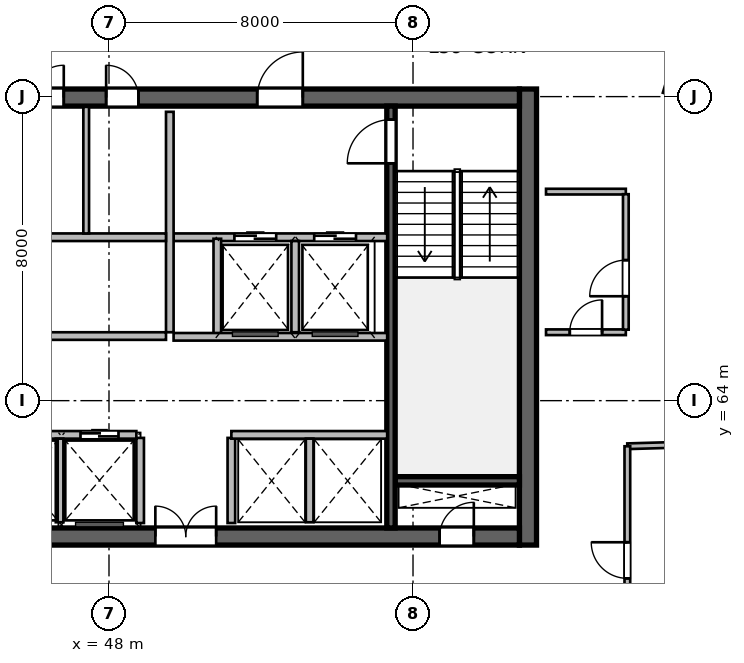
"""IFC4 building model, lengths in metres.
Left out: names, types, materials, properties, quantities, classifications, styles, units other than length and angle.
Written with IfcOpenShell. Run it as: python <this file> out.ifc"""

import sys

from ifc_helpers import new_model, si_unit, direction, frame, frame_2d, origin, place, context, subcontext, project, spatial, rectangle, extrude, source, transform, mapped, element, fill, save


model = new_model("IFC4")
c1 = context("Model", 3, precision=1e-05, world=origin(), true_north=direction((0.0, 1.0)))
c2 = subcontext(c1, "Body", "Model", "MODEL_VIEW")
j1 = project(units=[si_unit("LENGTHUNIT", "METRE"), si_unit("PLANEANGLEUNIT", "RADIAN")], contexts=[c1])
p1 = place(None, origin())
s1 = spatial("IfcSite", under=j1, at=p1, CompositionType="ELEMENT")
p2 = place(p1, origin())
s2 = spatial("IfcBuilding", under=s1, at=p2, CompositionType="ELEMENT")
p3 = place(p2, frame((0.0, 0.0, 243.0)))
s3 = spatial("IfcBuildingStorey", under=s2, at=p3, CompositionType="ELEMENT", Elevation=243.0)
m1 = source(origin(), c2, "Body", "SweptSolid", [
    extrude(rectangle(XDim=12.0, YDim=0.45, at=frame_2d((6.0, 0.0))), origin(), (0.0, 0.0, 1.0), 3.9),
])
p4 = place(p3, frame((59.025, 60.2, 0.0), z_axis=(0.0, 0.0, 1.0), x_axis=(0.0, 1.0, 0.0)))
e1 = element("IfcWall", 1, at=p4, inside=s3, PredefinedType="SHEAR", context=c2, shape_type="MappedRepresentation", body=[
    mapped(m1, transform((0.0, 0.0, 0.0), scale=1.0)),
])
m2 = source(origin(), c2, "Body", "SweptSolid", [
    extrude(rectangle(XDim=21.6, YDim=0.45, at=frame_2d((10.8, 0.0))), origin(), (0.0, 0.0, 1.0), 3.9),
])
p5 = place(p3, frame((37.2, 60.425, 0.0), z_axis=(0.0, 0.0, 1.0), x_axis=(1.0, 0.0, 0.0)))
e2 = element("IfcWall", 2, at=p5, inside=s3, PredefinedType="SHEAR", context=c2, shape_type="MappedRepresentation", body=[
    mapped(m2, transform((0.0, 0.0, 0.0), scale=1.0)),
])
p6 = place(p5, frame((1.1, 0.0, 0.0)))
e3 = element("IfcOpeningElement", 3, at=p6, cuts=e2, PredefinedType="OPENING", context=c2, shape_type="SweptSolid", body=[
    extrude(rectangle(XDim=1.15, YDim=2.15, at=frame_2d((0.575, 1.075))), frame((0.0, 0.235, 0.0), z_axis=(0.0, -1.0, 0.0), x_axis=(1.0, 0.0, 0.0)), (0.0, 0.0, 1.0), 0.47),
])
p7 = place(p5, frame((19.5, 0.0, 0.0)))
e4 = element("IfcOpeningElement", 4, at=p7, cuts=e2, PredefinedType="OPENING", context=c2, shape_type="SweptSolid", body=[
    extrude(rectangle(XDim=0.9, YDim=2.1, at=frame_2d((0.45, 1.05))), frame((0.0, 0.235, 0.0), z_axis=(0.0, -1.0, 0.0), x_axis=(1.0, 0.0, 0.0)), (0.0, 0.0, 1.0), 0.47),
])
p8 = place(p5, frame((12.02, 0.0, 0.0)))
e5 = element("IfcOpeningElement", 5, at=p8, cuts=e2, PredefinedType="OPENING", context=c2, shape_type="SweptSolid", body=[
    extrude(rectangle(XDim=1.6, YDim=2.15, at=frame_2d((0.8, 1.075))), frame((0.0, 0.235, 0.0), z_axis=(0.0, -1.0, 0.0), x_axis=(1.0, 0.0, 0.0)), (0.0, 0.0, 1.0), 0.47),
])
p9 = place(p3, frame((37.2, 71.975, 0.0), z_axis=(0.0, 0.0, 1.0), x_axis=(1.0, 0.0, 0.0)))
e6 = element("IfcWall", 6, at=p9, inside=s3, PredefinedType="SHEAR", context=c2, shape_type="MappedRepresentation", body=[
    mapped(m2, transform((0.0, 0.0, 0.0), scale=1.0)),
])
p10 = place(p9, frame((1.2, 0.0, 0.0)))
e7 = element("IfcOpeningElement", 7, at=p10, cuts=e6, PredefinedType="OPENING", context=c2, shape_type="SweptSolid", body=[
    extrude(rectangle(XDim=0.9, YDim=2.1, at=frame_2d((0.45, 1.05))), frame((0.0, 0.235, 0.0), z_axis=(0.0, -1.0, 0.0), x_axis=(1.0, 0.0, 0.0)), (0.0, 0.0, 1.0), 0.47),
])
p11 = place(p9, frame((14.7, 0.0, 0.0)))
e8 = element("IfcOpeningElement", 8, at=p11, cuts=e6, PredefinedType="OPENING", context=c2, shape_type="SweptSolid", body=[
    extrude(rectangle(XDim=1.2, YDim=2.15, at=frame_2d((0.6, 1.075))), frame((0.0, 0.235, 0.0), z_axis=(0.0, -1.0, 0.0), x_axis=(1.0, 0.0, 0.0)), (0.0, 0.0, 1.0), 0.47),
])
p12 = place(p9, frame((4.15, 0.0, 0.0)))
e9 = element("IfcOpeningElement", 9, at=p12, cuts=e6, PredefinedType="OPENING", context=c2, shape_type="SweptSolid", body=[
    extrude(rectangle(XDim=1.3, YDim=2.15, at=frame_2d((0.65, 1.075))), frame((0.0, 0.235, 0.0), z_axis=(0.0, -1.0, 0.0), x_axis=(1.0, 0.0, 0.0)), (0.0, 0.0, 1.0), 0.47),
])
p13 = place(p9, frame((6.76, 0.0, 0.0)))
e10 = element("IfcOpeningElement", 10, at=p13, cuts=e6, PredefinedType="OPENING", context=c2, shape_type="SweptSolid", body=[
    extrude(rectangle(XDim=0.85, YDim=2.1, at=frame_2d((0.425, 1.05))), frame((0.0, 0.235, 0.0), z_axis=(0.0, -1.0, 0.0), x_axis=(1.0, 0.0, 0.0)), (0.0, 0.0, 1.0), 0.47),
])
p14 = place(p9, frame((8.76, 0.0, 0.0)))
e11 = element("IfcOpeningElement", 11, at=p14, cuts=e6, PredefinedType="OPENING", context=c2, shape_type="SweptSolid", body=[
    extrude(rectangle(XDim=0.85, YDim=2.1, at=frame_2d((0.425, 1.05))), frame((0.0, 0.235, 0.0), z_axis=(0.0, -1.0, 0.0), x_axis=(1.0, 0.0, 0.0)), (0.0, 0.0, 1.0), 0.47),
])
p15 = place(p9, frame((10.725, 0.0, 0.0)))
e12 = element("IfcOpeningElement", 12, at=p15, cuts=e6, PredefinedType="OPENING", context=c2, shape_type="SweptSolid", body=[
    extrude(rectangle(XDim=0.85, YDim=2.1, at=frame_2d((0.425, 1.05))), frame((0.0, 0.235, 0.0), z_axis=(0.0, -1.0, 0.0), x_axis=(1.0, 0.0, 0.0)), (0.0, 0.0, 1.0), 0.47),
])
m3 = source(origin(), c2, "Body", "SweptSolid", [
    extrude(rectangle(XDim=3.27, YDim=0.22, at=frame_2d((1.635, 0.0))), origin(), (0.0, 0.0, 1.0), 3.9),
])
p16 = place(p3, frame((55.53, 61.89, 0.0), z_axis=(0.0, 0.0, 1.0), x_axis=(1.0, 0.0, 0.0)))
e13 = element("IfcWall", 13, at=p16, inside=s3, PredefinedType="SHEAR", context=c2, shape_type="MappedRepresentation", body=[
    mapped(m3, transform((0.0, 0.0, 0.0), scale=1.0)),
])
m4 = source(origin(), c2, "Body", "SweptSolid", [
    extrude(rectangle(XDim=11.1, YDim=0.22, at=frame_2d((5.55, 0.0))), origin(), (0.0, 0.0, 1.0), 3.9),
])
p17 = place(p3, frame((55.42, 60.65, 0.0), z_axis=(0.0, 0.0, 1.0), x_axis=(0.0, 1.0, 0.0)))
e14 = element("IfcWall", 14, at=p17, inside=s3, PredefinedType="SHEAR", context=c2, shape_type="MappedRepresentation", body=[
    mapped(m4, transform((0.0, 0.0, 0.0), scale=1.0)),
])
p18 = place(p17, frame((9.595, 0.0, 0.0)))
e15 = element("IfcOpeningElement", 15, at=p18, cuts=e14, PredefinedType="OPENING", context=c2, shape_type="SweptSolid", body=[
    extrude(rectangle(XDim=1.15, YDim=2.15, at=frame_2d((0.575, 1.075))), frame((0.0, 0.12, 0.0), z_axis=(0.0, -1.0, 0.0), x_axis=(1.0, 0.0, 0.0)), (0.0, 0.0, 1.0), 0.24),
])
m5 = source(origin(), c2, "Body", "SweptSolid", [
    extrude(rectangle(XDim=2.24, YDim=0.2, at=frame_2d((1.12, 0.0))), origin(), (0.0, 0.0, 1.0), 3.65),
])
for number, where, z_axis, x_axis in (
    (16, (48.82, 60.78, 0.0), (0.0, 0.0, 1.0), (0.0, 1.0, 0.0)),
    (17, (51.22, 60.78, 0.0), (0.0, 0.0, 1.0), (0.0, 1.0, 0.0)),
):
    element("IfcWall", number, at=place(p3, frame(where, z_axis=z_axis, x_axis=x_axis)), inside=s3, PredefinedType="SOLIDWALL", context=c2, shape_type="MappedRepresentation", body=[
        mapped(m5, transform((0.0, 0.0, 0.0), scale=1.0)),
    ])
m6 = source(origin(), c2, "Body", "SweptSolid", [
    extrude(rectangle(XDim=5.62, YDim=0.2, at=frame_2d((2.81, 0.0))), origin(), (0.0, 0.0, 1.0), 3.65),
])
p19 = place(p3, frame((49.7, 68.3, 0.0), z_axis=(0.0, 0.0, 1.0), x_axis=(1.0, 0.0, 0.0)))
e18 = element("IfcWall", 18, at=p19, inside=s3, PredefinedType="SOLIDWALL", context=c2, shape_type="MappedRepresentation", body=[
    mapped(m6, transform((0.0, 0.0, 0.0), scale=1.0)),
])
p20 = place(p19, frame((1.6, 0.0, 0.0)))
e19 = element("IfcOpeningElement", 19, at=p20, cuts=e18, PredefinedType="OPENING", context=c2, shape_type="SweptSolid", body=[
    extrude(rectangle(XDim=1.1, YDim=2.15, at=frame_2d((0.55, 1.075))), frame((0.0, 0.11, 0.0), z_axis=(0.0, -1.0, 0.0), x_axis=(1.0, 0.0, 0.0)), (0.0, 0.0, 1.0), 0.22),
])
p21 = place(p19, frame((3.7, 0.0, 0.0)))
e20 = element("IfcOpeningElement", 20, at=p21, cuts=e18, PredefinedType="OPENING", context=c2, shape_type="SweptSolid", body=[
    extrude(rectangle(XDim=1.1, YDim=2.15, at=frame_2d((0.55, 1.075))), frame((0.0, 0.11, 0.0), z_axis=(0.0, -1.0, 0.0), x_axis=(1.0, 0.0, 0.0)), (0.0, 0.0, 1.0), 0.22),
])
m7 = source(origin(), c2, "Body", "SweptSolid", [
    extrude(rectangle(XDim=5.8, YDim=0.2, at=frame_2d((2.9, 0.0))), origin(), (0.0, 0.0, 1.0), 3.65),
])
p22 = place(p3, frame((49.6, 65.8, 0.0), z_axis=(0.0, 0.0, 1.0), x_axis=(0.0, 1.0, 0.0)))
e21 = element("IfcWall", 21, at=p22, inside=s3, PredefinedType="SOLIDWALL", context=c2, shape_type="MappedRepresentation", body=[
    mapped(m7, transform((0.0, 0.0, 0.0), scale=1.0)),
])
m8 = source(origin(), c2, "Body", "SweptSolid", [
    extrude(rectangle(XDim=2.58, YDim=0.2, at=frame_2d((1.29, 0.0))), origin(), (0.0, 0.0, 1.0), 3.65),
])
p23 = place(p3, frame((50.85, 65.68, 0.0), z_axis=(0.0, 0.0, 1.0), x_axis=(0.0, 1.0, 0.0)))
e22 = element("IfcWall", 22, at=p23, inside=s3, PredefinedType="SOLIDWALL", context=c2, shape_type="MappedRepresentation", body=[
    mapped(m8, transform((0.0, 0.0, 0.0), scale=1.0)),
])
m9 = source(origin(), c2, "Body", "SweptSolid", [
    extrude(rectangle(XDim=2.4, YDim=0.2, at=frame_2d((1.2, 0.0))), origin(), (0.0, 0.0, 1.0), 3.65),
])
p24 = place(p3, frame((52.9, 65.8, 0.0), z_axis=(0.0, 0.0, 1.0), x_axis=(0.0, 1.0, 0.0)))
e23 = element("IfcWall", 23, at=p24, inside=s3, PredefinedType="SOLIDWALL", context=c2, shape_type="MappedRepresentation", body=[
    mapped(m9, transform((0.0, 0.0, 0.0), scale=1.0)),
])
p25 = place(p3, frame((49.7, 65.68, 0.0), z_axis=(0.0, 0.0, 1.0), x_axis=(1.0, 0.0, 0.0)))
e24 = element("IfcWall", 24, at=p25, inside=s3, PredefinedType="SOLIDWALL", context=c2, shape_type="MappedRepresentation", body=[
    mapped(m6, transform((0.0, 0.0, 0.0), scale=1.0)),
])
m10 = source(origin(), c2, "Body", "SweptSolid", [
    extrude(rectangle(XDim=8.8, YDim=0.2, at=frame_2d((4.4, 0.0))), origin(), (0.0, 0.0, 1.0), 3.65),
])
p26 = place(p3, frame((40.7, 68.3, 0.0), z_axis=(0.0, 0.0, 1.0), x_axis=(1.0, 0.0, 0.0)))
e25 = element("IfcWall", 25, at=p26, inside=s3, PredefinedType="SOLIDWALL", context=c2, shape_type="MappedRepresentation", body=[
    mapped(m10, transform((0.0, 0.0, 0.0), scale=1.0)),
])
m11 = source(origin(), c2, "Body", "SweptSolid", [
    extrude(rectangle(XDim=3.33, YDim=0.15, at=frame_2d((1.665, 0.0))), origin(), (0.0, 0.0, 1.0), 3.65),
])
p27 = place(p3, frame((47.4, 68.4, 0.0), z_axis=(0.0, 0.0, 1.0), x_axis=(0.0, 1.0, 0.0)))
e26 = element("IfcWall", 26, at=p27, inside=s3, PredefinedType="PARTITIONING", context=c2, shape_type="MappedRepresentation", body=[
    mapped(m11, transform((0.0, 0.0, 0.0), scale=1.0)),
])
m12 = source(origin(), c2, "Body", "SweptSolid", [
    extrude(rectangle(XDim=8.02, YDim=0.2, at=frame_2d((4.01, 0.0))), origin(), (0.0, 0.0, 1.0), 3.65),
])
p28 = place(p3, frame((40.7, 63.1, 0.0), z_axis=(0.0, 0.0, 1.0), x_axis=(1.0, 0.0, 0.0)))
e27 = element("IfcWall", 27, at=p28, inside=s3, PredefinedType="SOLIDWALL", context=c2, shape_type="MappedRepresentation", body=[
    mapped(m12, transform((0.0, 0.0, 0.0), scale=1.0)),
])
p29 = place(p28, frame((0.72, 0.0, 0.0)))
e28 = element("IfcOpeningElement", 28, at=p29, cuts=e27, PredefinedType="OPENING", context=c2, shape_type="SweptSolid", body=[
    extrude(rectangle(XDim=1.0, YDim=2.15, at=frame_2d((0.5, 1.075))), frame((0.0, 0.11, 0.0), z_axis=(0.0, -1.0, 0.0), x_axis=(1.0, 0.0, 0.0)), (0.0, 0.0, 1.0), 0.22),
])
p30 = place(p28, frame((2.62, 0.0, 0.0)))
e29 = element("IfcOpeningElement", 29, at=p30, cuts=e27, PredefinedType="OPENING", context=c2, shape_type="SweptSolid", body=[
    extrude(rectangle(XDim=1.0, YDim=2.15, at=frame_2d((0.5, 1.075))), frame((0.0, 0.11, 0.0), z_axis=(0.0, -1.0, 0.0), x_axis=(1.0, 0.0, 0.0)), (0.0, 0.0, 1.0), 0.22),
])
p31 = place(p28, frame((4.55, 0.0, 0.0)))
e30 = element("IfcOpeningElement", 30, at=p31, cuts=e27, PredefinedType="OPENING", context=c2, shape_type="SweptSolid", body=[
    extrude(rectangle(XDim=1.0, YDim=2.15, at=frame_2d((0.5, 1.075))), frame((0.0, 0.11, 0.0), z_axis=(0.0, -1.0, 0.0), x_axis=(1.0, 0.0, 0.0)), (0.0, 0.0, 1.0), 0.22),
])
p32 = place(p28, frame((6.55, 0.0, 0.0)))
e31 = element("IfcOpeningElement", 31, at=p32, cuts=e27, PredefinedType="OPENING", context=c2, shape_type="SweptSolid", body=[
    extrude(rectangle(XDim=1.0, YDim=2.15, at=frame_2d((0.5, 1.075))), frame((0.0, 0.11, 0.0), z_axis=(0.0, -1.0, 0.0), x_axis=(1.0, 0.0, 0.0)), (0.0, 0.0, 1.0), 0.22),
])
m13 = source(origin(), c2, "Body", "SweptSolid", [
    extrude(rectangle(XDim=4.1, YDim=0.2, at=frame_2d((2.05, 0.0))), origin(), (0.0, 0.0, 1.0), 3.65),
])
p33 = place(p3, frame((51.22, 63.1, 0.0), z_axis=(0.0, 0.0, 1.0), x_axis=(1.0, 0.0, 0.0)))
e32 = element("IfcWall", 32, at=p33, inside=s3, PredefinedType="SOLIDWALL", context=c2, shape_type="MappedRepresentation", body=[
    mapped(m13, transform((0.0, 0.0, 0.0), scale=1.0)),
])
m14 = source(origin(), c2, "Body", "SweptSolid", [
    extrude(rectangle(XDim=2.2, YDim=0.2, at=frame_2d((1.1, 0.0))), origin(), (0.0, 0.0, 1.0), 3.65),
])
for number, where, z_axis, x_axis in (
    (33, (46.7, 60.8, 0.0), (0.0, 0.0, 1.0), (0.0, 1.0, 0.0)),
    (34, (53.28, 60.8, 0.0), (0.0, 0.0, 1.0), (0.0, 1.0, 0.0)),
):
    element("IfcWall", number, at=place(p3, frame(where, z_axis=z_axis, x_axis=x_axis)), inside=s3, PredefinedType="SOLIDWALL", context=c2, shape_type="MappedRepresentation", body=[
        mapped(m14, transform((0.0, 0.0, 0.0), scale=1.0)),
    ])
p34 = place(p3, frame((40.7, 65.7, 0.0), z_axis=(0.0, 0.0, 1.0), x_axis=(1.0, 0.0, 0.0)))
e35 = element("IfcWall", 35, at=p34, inside=s3, PredefinedType="SOLIDWALL", context=c2, shape_type="MappedRepresentation", body=[
    mapped(m10, transform((0.0, 0.0, 0.0), scale=1.0)),
])
p35 = place(p34, frame((3.8, 0.0, 0.0)))
e36 = element("IfcOpeningElement", 36, at=p35, cuts=e35, PredefinedType="OPENING", context=c2, shape_type="SweptSolid", body=[
    extrude(rectangle(XDim=0.95, YDim=2.15, at=frame_2d((0.475, 1.075))), frame((0.0, 0.11, 0.0), z_axis=(0.0, -1.0, 0.0), x_axis=(1.0, 0.0, 0.0)), (0.0, 0.0, 1.0), 0.22),
])
m15 = source(origin(), c2, "Body", "SweptSolid", [
    extrude(rectangle(XDim=2.1, YDim=0.15, at=frame_2d((1.05, 0.0))), origin(), (0.0, 0.0, 1.0), 3.65),
])
p36 = place(p3, frame((59.5, 65.8, 0.0), z_axis=(0.0, 0.0, 1.0), x_axis=(1.0, 0.0, 0.0)))
e37 = element("IfcWall", 37, at=p36, inside=s3, PredefinedType="PARTITIONING", context=c2, shape_type="MappedRepresentation", body=[
    mapped(m15, transform((0.0, 0.0, 0.0), scale=1.0)),
])
p37 = place(p36, frame((0.625, 0.0, 0.0)))
e38 = element("IfcOpeningElement", 38, at=p37, cuts=e37, PredefinedType="OPENING", context=c2, shape_type="SweptSolid", body=[
    extrude(rectangle(XDim=0.85, YDim=2.1, at=frame_2d((0.425, 1.05))), frame((0.0, 0.085, 0.0), z_axis=(0.0, -1.0, 0.0), x_axis=(1.0, 0.0, 0.0)), (0.0, 0.0, 1.0), 0.17),
])
p38 = place(p3, frame((59.5, 69.5, 0.0), z_axis=(0.0, 0.0, 1.0), x_axis=(1.0, 0.0, 0.0)))
e39 = element("IfcWall", 39, at=p38, inside=s3, PredefinedType="PARTITIONING", context=c2, shape_type="MappedRepresentation", body=[
    mapped(m15, transform((0.0, 0.0, 0.0), scale=1.0)),
])
m16 = source(origin(), c2, "Body", "SweptSolid", [
    extrude(rectangle(XDim=3.565, YDim=0.15, at=frame_2d((1.783, 0.0))), origin(), (0.0, 0.0, 1.0), 3.65),
])
p39 = place(p3, frame((61.6, 65.867, 0.0), z_axis=(0.0, 0.0, 1.0), x_axis=(0.0, 1.0, 0.0)))
e40 = element("IfcWall", 40, at=p39, inside=s3, PredefinedType="PARTITIONING", context=c2, shape_type="MappedRepresentation", body=[
    mapped(m16, transform((0.0, 0.0, 0.0), scale=1.0)),
])
p40 = place(p39, frame((0.88, 0.0, 0.0)))
e41 = element("IfcOpeningElement", 41, at=p40, cuts=e40, PredefinedType="OPENING", context=c2, shape_type="SweptSolid", body=[
    extrude(rectangle(XDim=0.95, YDim=2.1, at=frame_2d((0.475, 1.05))), frame((0.0, 0.085, 0.0), z_axis=(0.0, -1.0, 0.0), x_axis=(1.0, 0.0, 0.0)), (0.0, 0.0, 1.0), 0.17),
])
m17 = source(origin(), c2, "Body", "SweptSolid", [
    extrude(rectangle(XDim=13.315, YDim=0.15, at=frame_2d((6.657, 0.0))), origin(), (0.0, 0.0, 1.0), 3.65),
])
p41 = place(p3, frame((61.64, 62.8, 0.0), z_axis=(0.0, 0.0, 1.0), x_axis=(0.999574400598, 0.029172207124, 0.0)))
e42 = element("IfcWall", 42, at=p41, inside=s3, PredefinedType="PARTITIONING", context=c2, shape_type="MappedRepresentation", body=[
    mapped(m17, transform((0.0, 0.0, 0.0), scale=1.0)),
])
m18 = source(origin(), c2, "Body", "SweptSolid", [
    extrude(rectangle(XDim=4.84, YDim=0.15, at=frame_2d((2.42, 0.0))), origin(), (0.0, 0.0, 1.0), 3.65),
])
p42 = place(p3, frame((61.64, 57.96, 0.0), z_axis=(0.0, 0.0, 1.0), x_axis=(0.0, 1.0, 0.0)))
e43 = element("IfcWall", 43, at=p42, inside=s3, PredefinedType="PARTITIONING", context=c2, shape_type="MappedRepresentation", body=[
    mapped(m18, transform((0.0, 0.0, 0.0), scale=1.0)),
])
p43 = place(p42, frame((1.364, 0.0, 0.0)))
e44 = element("IfcOpeningElement", 44, at=p43, cuts=e43, PredefinedType="OPENING", context=c2, shape_type="SweptSolid", body=[
    extrude(rectangle(XDim=0.95, YDim=2.1, at=frame_2d((0.475, 1.05))), frame((0.0, 0.085, 0.0), z_axis=(0.0, -1.0, 0.0), x_axis=(1.0, 0.0, 0.0)), (0.0, 0.0, 1.0), 0.17),
])
m19 = source(origin(), c2, "Body", "SweptSolid", [
    extrude(rectangle(XDim=0.9, YDim=2.1, at=frame_2d((0.45, 1.05))), frame((0.0, 0.025, 0.0), z_axis=(0.0, -1.0, 0.0), x_axis=(1.0, 0.0, 0.0)), (0.0, 0.0, 1.0), 0.05),
])
p44 = place(p7, origin())
e45 = element("IfcDoor", 45, at=p44, inside=s3, OperationType="SINGLE_SWING_RIGHT", PredefinedType="DOOR", context=c2, shape_type="MappedRepresentation", body=[
    mapped(m19, transform((0.0, 0.0, 0.0), scale=1.0)),
])
fill(e4, e45)
m20 = source(origin(), c2, "Body", "SweptSolid", [
    extrude(rectangle(XDim=1.15, YDim=2.15, at=frame_2d((0.575, 1.075))), frame((0.0, 0.025, 0.0), z_axis=(0.0, -1.0, 0.0), x_axis=(1.0, 0.0, 0.0)), (0.0, 0.0, 1.0), 0.05),
])
p45 = place(p18, origin())
e46 = element("IfcDoor", 46, at=p45, inside=s3, OperationType="SINGLE_SWING_LEFT", PredefinedType="DOOR", context=c2, shape_type="MappedRepresentation", body=[
    mapped(m20, transform((0.0, 0.0, 0.0), scale=1.0)),
])
fill(e15, e46)
m21 = source(origin(), c2, "Body", "SweptSolid", [
    extrude(rectangle(XDim=1.6, YDim=2.15, at=frame_2d((0.8, 1.075))), frame((0.0, 0.025, 0.0), z_axis=(0.0, -1.0, 0.0), x_axis=(1.0, 0.0, 0.0)), (0.0, 0.0, 1.0), 0.05),
])
p46 = place(p8, origin())
e47 = element("IfcDoor", 47, at=p46, inside=s3, OperationType="DOUBLE_DOOR_SINGLE_SWING", PredefinedType="DOOR", context=c2, shape_type="MappedRepresentation", body=[
    mapped(m21, transform((0.0, 0.0, 0.0), scale=1.0)),
])
fill(e5, e47)
m22 = source(origin(), c2, "Body", "SweptSolid", [
    extrude(rectangle(XDim=1.2, YDim=2.15, at=frame_2d((0.6, 1.075))), frame((0.0, 0.025, 0.0), z_axis=(0.0, -1.0, 0.0), x_axis=(1.0, 0.0, 0.0)), (0.0, 0.0, 1.0), 0.05),
])
p47 = place(p11, origin())
e48 = element("IfcDoor", 48, at=p47, inside=s3, OperationType="SINGLE_SWING_RIGHT", PredefinedType="DOOR", context=c2, shape_type="MappedRepresentation", body=[
    mapped(m22, transform((0.0, 0.0, 0.0), scale=1.0)),
])
fill(e8, e48)
m23 = source(origin(), c2, "Body", "SweptSolid", [
    extrude(rectangle(XDim=1.1, YDim=2.15, at=frame_2d((0.55, 1.075))), frame((0.0, 0.025, 0.0), z_axis=(0.0, -1.0, 0.0), x_axis=(1.0, 0.0, 0.0)), (0.0, 0.0, 1.0), 0.05),
])
p48 = place(p20, origin())
e49 = element("IfcDoor", 49, at=p48, inside=s3, OperationType="DOUBLE_DOOR_SLIDING", PredefinedType="DOOR", context=c2, shape_type="MappedRepresentation", body=[
    mapped(m23, transform((0.0, 0.0, 0.0), scale=1.0)),
])
fill(e19, e49)
p49 = place(p21, origin())
e50 = element("IfcDoor", 50, at=p49, inside=s3, OperationType="DOUBLE_DOOR_SLIDING", PredefinedType="DOOR", context=c2, shape_type="MappedRepresentation", body=[
    mapped(m23, transform((0.0, 0.0, 0.0), scale=1.0)),
])
fill(e20, e50)
m24 = source(origin(), c2, "Body", "SweptSolid", [
    extrude(rectangle(XDim=0.85, YDim=2.1, at=frame_2d((0.425, 1.05))), frame((0.0, 0.025, 0.0), z_axis=(0.0, -1.0, 0.0), x_axis=(1.0, 0.0, 0.0)), (0.0, 0.0, 1.0), 0.05),
])
p50 = place(p14, origin())
e51 = element("IfcDoor", 51, at=p50, inside=s3, OperationType="SINGLE_SWING_RIGHT", PredefinedType="DOOR", context=c2, shape_type="MappedRepresentation", body=[
    mapped(m24, transform((0.0, 0.0, 0.0), scale=1.0)),
])
fill(e11, e51)
p51 = place(p15, origin())
e52 = element("IfcDoor", 52, at=p51, inside=s3, OperationType="SINGLE_SWING_LEFT", PredefinedType="DOOR", context=c2, shape_type="MappedRepresentation", body=[
    mapped(m24, transform((0.0, 0.0, 0.0), scale=1.0)),
])
fill(e12, e52)
m25 = source(origin(), c2, "Body", "SweptSolid", [
    extrude(rectangle(XDim=1.0, YDim=2.15, at=frame_2d((0.5, 1.075))), frame((0.0, 0.025, 0.0), z_axis=(0.0, -1.0, 0.0), x_axis=(1.0, 0.0, 0.0)), (0.0, 0.0, 1.0), 0.05),
])
p52 = place(p32, origin())
e53 = element("IfcDoor", 53, at=p52, inside=s3, OperationType="DOUBLE_DOOR_SLIDING", PredefinedType="DOOR", context=c2, shape_type="MappedRepresentation", body=[
    mapped(m25, transform((0.0, 0.0, 0.0), scale=1.0)),
])
fill(e31, e53)
p53 = place(p37, origin())
e54 = element("IfcDoor", 54, at=p53, inside=s3, OperationType="SINGLE_SWING_RIGHT", PredefinedType="DOOR", context=c2, shape_type="MappedRepresentation", body=[
    mapped(m24, transform((0.0, 0.0, 0.0), scale=1.0)),
])
fill(e38, e54)
m26 = source(origin(), c2, "Body", "SweptSolid", [
    extrude(rectangle(XDim=0.95, YDim=2.1, at=frame_2d((0.475, 1.05))), frame((0.0, 0.025, 0.0), z_axis=(0.0, -1.0, 0.0), x_axis=(1.0, 0.0, 0.0)), (0.0, 0.0, 1.0), 0.05),
])
p54 = place(p43, origin())
e55 = element("IfcDoor", 55, at=p54, inside=s3, OperationType="SINGLE_SWING_RIGHT", PredefinedType="DOOR", context=c2, shape_type="MappedRepresentation", body=[
    mapped(m26, transform((0.0, 0.0, 0.0), scale=1.0)),
])
fill(e44, e55)
p55 = place(p40, origin())
e56 = element("IfcDoor", 56, at=p55, inside=s3, OperationType="SINGLE_SWING_LEFT", PredefinedType="DOOR", context=c2, shape_type="MappedRepresentation", body=[
    mapped(m26, transform((0.0, 0.0, 0.0), scale=1.0)),
])
fill(e41, e56)
save(model, sys.argv[1])
